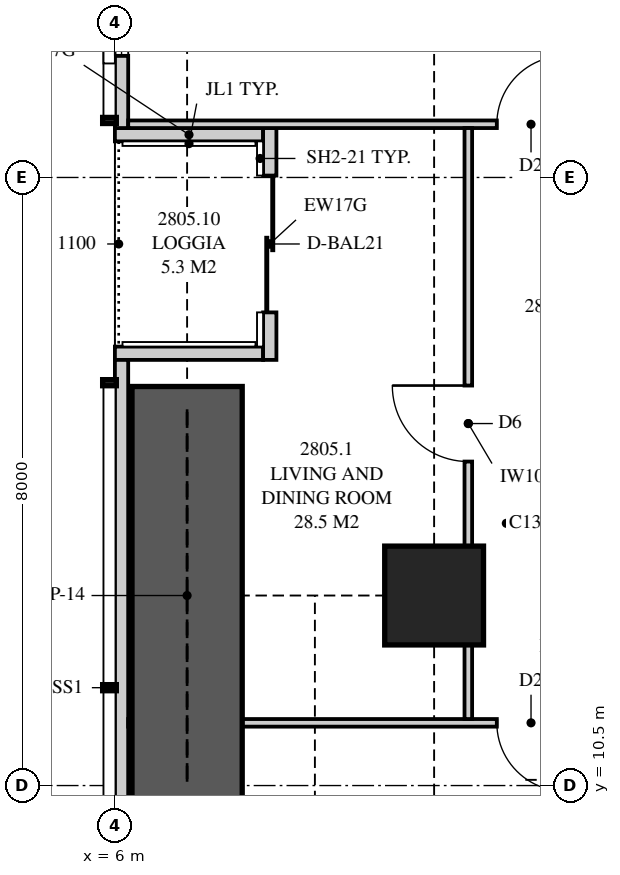
"""IFC4 building model, lengths in metres.
Left out: names, types, materials, properties, quantities, classifications, styles, units other than length and angle.
Written with IfcOpenShell. Run it as: python <this file> out.ifc"""

import sys

from ifc_helpers import new_model, si_unit, direction, frame, frame_2d, origin, origin_2d, place, context, subcontext, project, spatial, polyline, rectangle, outline, extrude, element, fill, save


model = new_model("IFC4")
c1 = context("Model", 3, precision=1e-05, world=origin(), true_north=direction((0.0, 1.0)))
c2 = subcontext(c1, "Body", "Model", "MODEL_VIEW")
j1 = project(units=[si_unit("LENGTHUNIT", "METRE"), si_unit("PLANEANGLEUNIT", "RADIAN")], contexts=[c1])
p1 = place(None, origin())
s1 = spatial("IfcSite", under=j1, at=p1, CompositionType="ELEMENT")
p2 = place(p1, origin())
s2 = spatial("IfcBuilding", under=s1, at=p2, CompositionType="ELEMENT")
p3 = place(p2, frame((0.0, 0.0, 104.85)))
s3 = spatial("IfcBuildingStorey", under=s2, at=p3, CompositionType="ELEMENT", Elevation=104.85)
p4 = place(p3, frame((10.2, 13.0, 0.0), z_axis=(0.0, 0.0, 1.0), x_axis=(1.0, 0.0, 0.0)))
e1 = element("IfcColumn", 1, at=p4, inside=s3, PredefinedType="COLUMN", context=c2, shape_type="SweptSolid", body=[
    extrude(rectangle(XDim=1.3, YDim=1.3, at=origin_2d()), origin(), (0.0, 0.0, 1.0), 3.35),
])
p5 = place(p3, frame((6.087, 34.949, 0.0), z_axis=(0.0, 0.0, 1.0), x_axis=(0.0, -1.0, 0.0)))
e2 = element("IfcWall", 2, at=p5, inside=s3, PredefinedType="SOLIDWALL", context=c2, shape_type="SweptSolid", body=[
    extrude(outline(polyline([(0.0, 0.0), (15.799, 0.0), (15.799, 2.15), (9.949, 2.15), (9.949, 3.11), (9.823, 3.11), (9.823, 2.15), (9.73, 2.15), (9.73, 3.11), (0.0, 3.11), (0.0, 0.0)])), frame((0.0, 0.087, 0.0), z_axis=(0.0, -1.0, 0.0), x_axis=(1.0, 0.0, 0.0)), (0.0, 0.0, 1.0), 0.175),
])
p6 = place(p5, frame((2.724, 0.0, 0.4)))
e3 = element("IfcOpeningElement", 3, at=p6, cuts=e2, PredefinedType="OPENING", context=c2, shape_type="SweptSolid", body=[
    extrude(rectangle(XDim=1.8, YDim=1.7, at=frame_2d((0.9, 0.85))), frame((0.0, 0.097, 0.0), z_axis=(0.0, -1.0, 0.0), x_axis=(1.0, 0.0, 0.0)), (0.0, 0.0, 1.0), 0.195),
])
p7 = place(p5, frame((5.899, 0.0, 0.4)))
e4 = element("IfcOpeningElement", 4, at=p7, cuts=e2, PredefinedType="OPENING", context=c2, shape_type="SweptSolid", body=[
    extrude(rectangle(XDim=1.2, YDim=1.7, at=frame_2d((0.6, 0.85))), frame((0.0, 0.097, 0.0), z_axis=(0.0, -1.0, 0.0), x_axis=(1.0, 0.0, 0.0)), (0.0, 0.0, 1.0), 0.195),
])
p8 = place(p5, frame((13.049, 0.0, 0.4)))
e5 = element("IfcOpeningElement", 5, at=p8, cuts=e2, PredefinedType="OPENING", context=c2, shape_type="SweptSolid", body=[
    extrude(rectangle(XDim=1.8, YDim=1.7, at=frame_2d((0.9, 0.85))), frame((0.0, 0.097, 0.0), z_axis=(0.0, -1.0, 0.0), x_axis=(1.0, 0.0, 0.0)), (0.0, 0.0, 1.0), 0.195),
])
p9 = place(p3, frame((6.087, 16.1, 0.0), z_axis=(0.0, 0.0, 1.0), x_axis=(0.0, -1.0, 0.0)))
e6 = element("IfcWall", 6, at=p9, inside=s3, PredefinedType="SOLIDWALL", context=c2, shape_type="SweptSolid", body=[
    extrude(outline(polyline([(0.0, 0.0), (13.049, 0.0), (13.049, 3.11), (3.319, 3.11), (3.319, 2.15), (3.226, 2.15), (3.226, 3.11), (3.1, 3.11), (3.1, 2.15), (0.0, 2.15), (0.0, 0.0)])), frame((0.0, 0.087, 0.0), z_axis=(0.0, -1.0, 0.0), x_axis=(1.0, 0.0, 0.0)), (0.0, 0.0, 1.0), 0.175),
])
p10 = place(p9, frame((5.975, 0.0, 0.4)))
e7 = element("IfcOpeningElement", 7, at=p10, cuts=e6, PredefinedType="OPENING", context=c2, shape_type="SweptSolid", body=[
    extrude(rectangle(XDim=1.8, YDim=1.7, at=frame_2d((0.9, 0.85))), frame((0.0, 0.097, 0.0), z_axis=(0.0, -1.0, 0.0), x_axis=(1.0, 0.0, 0.0)), (0.0, 0.0, 1.0), 0.195),
])
p11 = place(p9, frame((9.025, 0.0, 0.4)))
e8 = element("IfcOpeningElement", 8, at=p11, cuts=e6, PredefinedType="OPENING", context=c2, shape_type="SweptSolid", body=[
    extrude(rectangle(XDim=1.8, YDim=1.7, at=frame_2d((0.9, 0.85))), frame((0.0, 0.097, 0.0), z_axis=(0.0, -1.0, 0.0), x_axis=(1.0, 0.0, 0.0)), (0.0, 0.0, 1.0), 0.195),
])
p12 = place(p3, frame((8.038, 19.15, 0.0), z_axis=(0.0, 0.0, 1.0), x_axis=(0.0, -1.0, 0.0)))
e9 = element("IfcWall", 9, at=p12, inside=s3, PredefinedType="SOLIDWALL", context=c2, shape_type="SweptSolid", body=[
    extrude(rectangle(XDim=3.05, YDim=0.175, at=frame_2d((1.525, 0.0))), origin(), (0.0, 0.0, 1.0), 3.11),
])
p13 = place(p12, frame((0.625, 0.0, 0.0)))
e10 = element("IfcOpeningElement", 10, at=p13, cuts=e9, PredefinedType="OPENING", context=c2, shape_type="SweptSolid", body=[
    extrude(rectangle(XDim=1.8, YDim=2.1, at=frame_2d((0.9, 1.05))), frame((0.0, 0.097, 0.0), z_axis=(0.0, -1.0, 0.0), x_axis=(1.0, 0.0, 0.0)), (0.0, 0.0, 1.0), 0.195),
])
for number, where, z_axis, x_axis in (
    (11, (6.0, 19.062, 0.0), (0.0, 0.0, 1.0), (1.0, 0.0, 0.0)),
    (12, (6.0, 16.188, 0.0), (0.0, 0.0, 1.0), (1.0, 0.0, 0.0)),
):
    element("IfcWall", number, at=place(p3, frame(where, z_axis=z_axis, x_axis=x_axis)), inside=s3, PredefinedType="SOLIDWALL", context=c2, shape_type="SweptSolid", body=[
        extrude(outline(polyline([(0.0, 0.0), (1.95, 0.0), (1.95, 3.11), (1.75, 3.11), (1.75, 2.15), (0.15, 2.15), (0.15, 3.11), (0.0, 3.11), (0.0, 0.0)])), frame((0.0, 0.087, 0.0), z_axis=(0.0, -1.0, 0.0), x_axis=(1.0, 0.0, 0.0)), (0.0, 0.0, 1.0), 0.175),
    ])
p14 = place(p3, frame((6.175, 11.325, 0.0), z_axis=(0.0, 0.0, 1.0), x_axis=(1.0, 0.0, 0.0)))
e13 = element("IfcWall", 13, at=p14, inside=s3, PredefinedType="PARTITIONING", context=c2, shape_type="SweptSolid", body=[
    extrude(outline(polyline([(0.175, 3.11), (0.0, 3.11), (0.0, 0.0), (0.529, 0.0), (0.529, 0.325), (1.021, 0.325), (1.021, 0.0), (11.4, 0.0), (11.4, 3.11), (5.285, 3.11), (5.285, 2.51), (2.765, 2.51), (2.765, 3.11), (2.744, 3.11), (2.744, 2.541), (2.169, 2.541), (2.169, 3.11), (1.918, 3.11), (1.918, 2.15), (1.021, 2.15), (1.021, 1.825), (0.529, 1.825), (0.529, 2.15), (0.175, 2.15), (0.175, 3.11)])), frame((0.0, 0.05, 0.0), z_axis=(0.0, -1.0, 0.0), x_axis=(1.0, 0.0, 0.0)), (0.0, 0.0, 1.0), 0.1),
])
p15 = place(p14, frame((4.85, 0.0, 0.0)))
e14 = element("IfcOpeningElement", 14, at=p15, cuts=e13, PredefinedType="OPENING", context=c2, shape_type="SweptSolid", body=[
    extrude(rectangle(XDim=0.9, YDim=2.1, at=frame_2d((0.45, 1.05))), frame((0.0, 0.06, 0.0), z_axis=(0.0, -1.0, 0.0), x_axis=(1.0, 0.0, 0.0)), (0.0, 0.0, 1.0), 0.12),
])
p16 = place(p14, frame((6.25, 0.0, 0.0)))
e15 = element("IfcOpeningElement", 15, at=p16, cuts=e13, PredefinedType="OPENING", context=c2, shape_type="SweptSolid", body=[
    extrude(rectangle(XDim=0.9, YDim=2.1, at=frame_2d((0.45, 1.05))), frame((0.0, 0.06, 0.0), z_axis=(0.0, -1.0, 0.0), x_axis=(1.0, 0.0, 0.0)), (0.0, 0.0, 1.0), 0.12),
])
p17 = place(p14, frame((9.7, 0.0, 0.0)))
e16 = element("IfcOpeningElement", 16, at=p17, cuts=e13, PredefinedType="OPENING", context=c2, shape_type="SweptSolid", body=[
    extrude(rectangle(XDim=0.7, YDim=2.1, at=frame_2d((0.35, 1.05))), frame((0.0, 0.06, 0.0), z_axis=(0.0, -1.0, 0.0), x_axis=(1.0, 0.0, 0.0)), (0.0, 0.0, 1.0), 0.12),
])
p18 = place(p3, frame((6.175, 19.2, 0.0), z_axis=(0.0, 0.0, 1.0), x_axis=(1.0, 0.0, 0.0)))
e17 = element("IfcWall", 17, at=p18, inside=s3, PredefinedType="PARTITIONING", context=c2, shape_type="SweptSolid", body=[
    extrude(outline(polyline([(0.0, 0.0), (11.4, 0.0), (11.4, 3.11), (5.285, 3.11), (5.285, 2.51), (2.765, 2.51), (2.765, 3.11), (1.635, 3.11), (1.635, 2.15), (0.0, 2.15), (0.0, 3.11), (0.0, 0.0)])), frame((0.0, 0.05, 0.0), z_axis=(0.0, -1.0, 0.0), x_axis=(1.0, 0.0, 0.0)), (0.0, 0.0, 1.0), 0.1),
])
p19 = place(p18, frame((4.85, 0.0, 0.0)))
e18 = element("IfcOpeningElement", 18, at=p19, cuts=e17, PredefinedType="OPENING", context=c2, shape_type="SweptSolid", body=[
    extrude(rectangle(XDim=0.9, YDim=2.1, at=frame_2d((0.45, 1.05))), frame((0.0, 0.06, 0.0), z_axis=(0.0, -1.0, 0.0), x_axis=(1.0, 0.0, 0.0)), (0.0, 0.0, 1.0), 0.12),
])
p20 = place(p18, frame((9.7, 0.0, 0.0)))
e19 = element("IfcOpeningElement", 19, at=p20, cuts=e17, PredefinedType="OPENING", context=c2, shape_type="SweptSolid", body=[
    extrude(rectangle(XDim=0.7, YDim=2.1, at=frame_2d((0.35, 1.05))), frame((0.0, 0.06, 0.0), z_axis=(0.0, -1.0, 0.0), x_axis=(1.0, 0.0, 0.0)), (0.0, 0.0, 1.0), 0.12),
])
p21 = place(p3, frame((10.65, 11.375, 0.0), z_axis=(0.0, 0.0, 1.0), x_axis=(0.0, 1.0, 0.0)))
e20 = element("IfcWall", 20, at=p21, inside=s3, PredefinedType="PARTITIONING", context=c2, shape_type="SweptSolid", body=[
    extrude(outline(polyline([(0.0, 0.0), (7.775, 0.0), (7.775, 3.11), (7.775, 2.51), (1.685, 2.51), (0.0, 2.51), (0.0, 3.11), (0.0, 0.0)])), frame((0.0, 0.05, 0.0), z_axis=(0.0, -1.0, 0.0), x_axis=(1.0, 0.0, 0.0)), (0.0, 0.0, 1.0), 0.1),
])
p22 = place(p21, frame((3.387, 0.0, 0.0)))
e21 = element("IfcOpeningElement", 21, at=p22, cuts=e20, PredefinedType="OPENING", context=c2, shape_type="SweptSolid", body=[
    extrude(rectangle(XDim=1.0, YDim=2.1, at=frame_2d((0.5, 1.05))), frame((0.0, 0.06, 0.0), z_axis=(0.0, -1.0, 0.0), x_axis=(1.0, 0.0, 0.0)), (0.0, 0.0, 1.0), 0.12),
])
p23 = place(p3, frame((6.95, 10.25, 0.0), z_axis=(0.0, 0.0, 1.0), x_axis=(0.0, 1.0, 0.0)))
e22 = element("IfcWall", 22, at=p23, inside=s3, PredefinedType="SHEAR", context=c2, shape_type="SweptSolid", body=[
    extrude(rectangle(XDim=5.5, YDim=1.45, at=frame_2d((2.75, 0.0))), origin(), (0.0, 0.0, 1.0), 3.35),
])
p24 = place(p8, origin())
e23 = element("IfcWindow", 23, at=p24, inside=s3, PartitioningType="SINGLE_PANEL", PredefinedType="WINDOW", context=c2, shape_type="SweptSolid", body=[
    extrude(rectangle(XDim=1.8, YDim=1.7, at=frame_2d((0.9, 0.85))), frame((0.0, 0.03, 0.0), z_axis=(0.0, -1.0, 0.0), x_axis=(1.0, 0.0, 0.0)), (0.0, 0.0, 1.0), 0.06),
])
fill(e5, e23)
p25 = place(p13, origin())
e24 = element("IfcDoor", 24, at=p25, inside=s3, OperationType="SLIDING_TO_LEFT", PredefinedType="DOOR", context=c2, shape_type="SweptSolid", body=[
    extrude(rectangle(XDim=1.8, YDim=2.1, at=frame_2d((0.9, 1.05))), frame((0.0, 0.025, 0.0), z_axis=(0.0, -1.0, 0.0), x_axis=(1.0, 0.0, 0.0)), (0.0, 0.0, 1.0), 0.05),
])
fill(e10, e24)
p26 = place(p15, frame((0.9, 0.0, 0.0), z_axis=(0.0, 0.0, 1.0), x_axis=(-1.0, 0.0, 0.0)))
e25 = element("IfcDoor", 25, at=p26, inside=s3, OperationType="SINGLE_SWING_LEFT", PredefinedType="DOOR", context=c2, shape_type="SweptSolid", body=[
    extrude(rectangle(XDim=0.9, YDim=2.1, at=frame_2d((0.45, 1.05))), frame((0.0, 0.025, 0.0), z_axis=(0.0, -1.0, 0.0), x_axis=(1.0, 0.0, 0.0)), (0.0, 0.0, 1.0), 0.05),
])
fill(e14, e25)
p27 = place(p19, origin())
e26 = element("IfcDoor", 26, at=p27, inside=s3, OperationType="SINGLE_SWING_RIGHT", PredefinedType="DOOR", context=c2, shape_type="SweptSolid", body=[
    extrude(rectangle(XDim=0.9, YDim=2.1, at=frame_2d((0.45, 1.05))), frame((0.0, 0.025, 0.0), z_axis=(0.0, -1.0, 0.0), x_axis=(1.0, 0.0, 0.0)), (0.0, 0.0, 1.0), 0.05),
])
fill(e18, e26)
p28 = place(p22, origin())
e27 = element("IfcDoor", 27, at=p28, inside=s3, OperationType="SINGLE_SWING_RIGHT", PredefinedType="DOOR", context=c2, shape_type="SweptSolid", body=[
    extrude(rectangle(XDim=1.0, YDim=2.1, at=frame_2d((0.5, 1.05))), frame((0.0, 0.025, 0.0), z_axis=(0.0, -1.0, 0.0), x_axis=(1.0, 0.0, 0.0)), (0.0, 0.0, 1.0), 0.05),
])
fill(e21, e27)
save(model, sys.argv[1])
